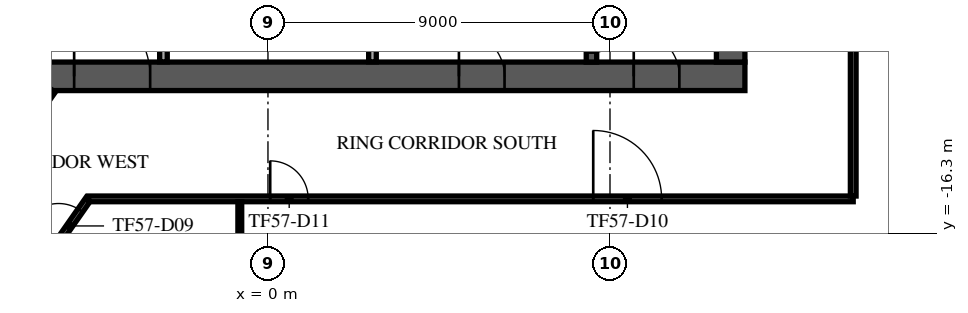
"""IFC4 building model, lengths in metres.
Left out: names, types, materials, properties, quantities, classifications, styles, units other than length and angle.
Written with IfcOpenShell. Run it as: python <this file> out.ifc"""

import sys

from ifc_helpers import new_model, si_unit, direction, frame, frame_2d, origin, place, context, subcontext, project, spatial, rectangle, extrude, element, fill, save


model = new_model("IFC4")
c1 = context("Model", 3, precision=1e-05, world=origin(), true_north=direction((0.0, 1.0)))
c2 = subcontext(c1, "Body", "Model", "MODEL_VIEW")
j1 = project(units=[si_unit("LENGTHUNIT", "METRE"), si_unit("PLANEANGLEUNIT", "RADIAN")], contexts=[c1])
p1 = place(None, origin())
s1 = spatial("IfcSite", under=j1, at=p1, CompositionType="ELEMENT")
p2 = place(p1, origin())
s2 = spatial("IfcBuilding", under=s1, at=p2, CompositionType="ELEMENT")
p3 = place(p2, frame((0.0, 0.0, 246.9)))
s3 = spatial("IfcBuildingStorey", under=s2, at=p3, CompositionType="ELEMENT", Elevation=246.9)
p4 = place(p3, frame((-12.55, -12.175, 0.0), z_axis=(0.0, 0.0, 1.0), x_axis=(1.0, 0.0, 0.0)))
e1 = element("IfcWall", 1, at=p4, inside=s3, PredefinedType="SHEAR", context=c2, shape_type="SweptSolid", body=[
    extrude(rectangle(XDim=25.1, YDim=0.75, at=frame_2d((12.55, 0.0))), origin(), (0.0, 0.0, 1.0), 3.64),
])
p5 = place(p4, frame((7.45, 0.0, 0.0)))
e2 = element("IfcOpeningElement", 2, at=p5, cuts=e1, PredefinedType="OPENING", context=c2, shape_type="SweptSolid", body=[
    extrude(rectangle(XDim=2.0, YDim=2.1, at=frame_2d((1.0, 1.05))), frame((0.0, 0.385, 0.0), z_axis=(0.0, -1.0, 0.0), x_axis=(1.0, 0.0, 0.0)), (0.0, 0.0, 1.0), 0.77),
])
p6 = place(p4, frame((17.575, 0.0, 0.0)))
e3 = element("IfcOpeningElement", 3, at=p6, cuts=e1, PredefinedType="OPENING", context=c2, shape_type="SweptSolid", body=[
    extrude(rectangle(XDim=1.2, YDim=2.1, at=frame_2d((0.6, 1.05))), frame((0.0, 0.385, 0.0), z_axis=(0.0, -1.0, 0.0), x_axis=(1.0, 0.0, 0.0)), (0.0, 0.0, 1.0), 0.77),
])
p7 = place(p4, frame((1.725, 0.0, 0.0)))
e4 = element("IfcOpeningElement", 4, at=p7, cuts=e1, PredefinedType="OPENING", context=c2, shape_type="SweptSolid", body=[
    extrude(rectangle(XDim=1.2, YDim=2.1, at=frame_2d((0.6, 1.05))), frame((0.0, 0.385, 0.0), z_axis=(0.0, -1.0, 0.0), x_axis=(1.0, 0.0, 0.0)), (0.0, 0.0, 1.0), 0.77),
])
p8 = place(p4, frame((22.175, 0.0, 0.0)))
e5 = element("IfcOpeningElement", 5, at=p8, cuts=e1, PredefinedType="OPENING", context=c2, shape_type="SweptSolid", body=[
    extrude(rectangle(XDim=1.2, YDim=2.1, at=frame_2d((0.6, 1.05))), frame((0.0, 0.385, 0.0), z_axis=(0.0, -1.0, 0.0), x_axis=(1.0, 0.0, 0.0)), (0.0, 0.0, 1.0), 0.77),
])
p9 = place(p3, frame((12.175, -11.8, 0.0), z_axis=(0.0, 0.0, 1.0), x_axis=(0.0, 1.0, 0.0)))
e6 = element("IfcWall", 6, at=p9, inside=s3, PredefinedType="SHEAR", context=c2, shape_type="SweptSolid", body=[
    extrude(rectangle(XDim=23.6, YDim=0.75, at=frame_2d((11.8, 0.0))), origin(), (0.0, 0.0, 1.0), 3.64),
])
p10 = place(p9, frame((10.6, 0.0, 0.0)))
e7 = element("IfcOpeningElement", 7, at=p10, cuts=e6, PredefinedType="OPENING", context=c2, shape_type="SweptSolid", body=[
    extrude(rectangle(XDim=2.4, YDim=2.4, at=frame_2d((1.2, 1.2))), frame((0.0, 0.385, 0.0), z_axis=(0.0, -1.0, 0.0), x_axis=(1.0, 0.0, 0.0)), (0.0, 0.0, 1.0), 0.77),
])
p11 = place(p3, frame((8.512, -4.55, 0.0), z_axis=(0.0, 0.0, 1.0), x_axis=(0.0, -1.0, 0.0)))
e8 = element("IfcWall", 8, at=p11, inside=s3, PredefinedType="SOLIDWALL", context=c2, shape_type="SweptSolid", body=[
    extrude(rectangle(XDim=7.25, YDim=0.275, at=frame_2d((3.625, 0.0))), origin(), (0.0, 0.0, 1.0), 3.64),
])
p12 = place(p11, frame((6.0, 0.0, 0.0)))
e9 = element("IfcOpeningElement", 9, at=p12, cuts=e8, PredefinedType="OPENING", context=c2, shape_type="SweptSolid", body=[
    extrude(rectangle(XDim=1.0, YDim=2.1, at=frame_2d((0.5, 1.05))), frame((0.0, 0.147, 0.0), z_axis=(0.0, -1.0, 0.0), x_axis=(1.0, 0.0, 0.0)), (0.0, 0.0, 1.0), 0.295),
])
p13 = place(p3, frame((-2.75, -11.795, 0.0), z_axis=(0.0, 0.0, 1.0), x_axis=(0.0, 1.0, 0.0)))
e10 = element("IfcWall", 10, at=p13, inside=s3, PredefinedType="PARTITIONING", context=c2, shape_type="SweptSolid", body=[
    extrude(rectangle(XDim=2.99, YDim=0.2, at=frame_2d((1.495, 0.0))), origin(), (0.0, 0.0, 1.0), 3.64),
])
p14 = place(p13, frame((0.657, 0.0, 0.0)))
e11 = element("IfcOpeningElement", 11, at=p14, cuts=e10, PredefinedType="OPENING", context=c2, shape_type="SweptSolid", body=[
    extrude(rectangle(XDim=1.8, YDim=2.1, at=frame_2d((0.9, 1.05))), frame((0.0, 0.11, 0.0), z_axis=(0.0, -1.0, 0.0), x_axis=(1.0, 0.0, 0.0)), (0.0, 0.0, 1.0), 0.22),
])
p15 = place(p3, frame((2.75, -11.795, 0.0), z_axis=(0.0, 0.0, 1.0), x_axis=(0.0, 1.0, 0.0)))
e12 = element("IfcWall", 12, at=p15, inside=s3, PredefinedType="PARTITIONING", context=c2, shape_type="SweptSolid", body=[
    extrude(rectangle(XDim=2.99, YDim=0.2, at=frame_2d((1.495, 0.0))), origin(), (0.0, 0.0, 1.0), 3.64),
])
p16 = place(p3, frame((-31.815, -13.98, 0.0), z_axis=(0.0, 0.0, 1.0), x_axis=(0.819151180661, -0.573577669737, 0.0)))
e13 = element("IfcWall", 13, at=p16, inside=s3, PredefinedType="STANDARD", context=c2, shape_type="SweptSolid", body=[
    extrude(rectangle(XDim=36.086, YDim=0.6, at=frame_2d((18.043, 0.0))), origin(), (0.0, 0.0, 1.0), 3.64),
])
p17 = place(p16, frame((1.205, 0.0, 0.9)))
e14 = element("IfcOpeningElement", 14, at=p17, cuts=e13, PredefinedType="OPENING", context=c2, shape_type="SweptSolid", body=[
    extrude(rectangle(XDim=2.1, YDim=2.1, at=frame_2d((1.05, 1.05))), frame((0.0, 0.31, 0.0), z_axis=(0.0, -1.0, 0.0), x_axis=(1.0, 0.0, 0.0)), (0.0, 0.0, 1.0), 0.62),
])
p18 = place(p16, frame((5.716, 0.0, 0.9)))
e15 = element("IfcOpeningElement", 15, at=p18, cuts=e13, PredefinedType="OPENING", context=c2, shape_type="SweptSolid", body=[
    extrude(rectangle(XDim=2.1, YDim=2.1, at=frame_2d((1.05, 1.05))), frame((0.0, 0.31, 0.0), z_axis=(0.0, -1.0, 0.0), x_axis=(1.0, 0.0, 0.0)), (0.0, 0.0, 1.0), 0.62),
])
p19 = place(p16, frame((10.227, 0.0, 0.9)))
e16 = element("IfcOpeningElement", 16, at=p19, cuts=e13, PredefinedType="OPENING", context=c2, shape_type="SweptSolid", body=[
    extrude(rectangle(XDim=2.1, YDim=2.1, at=frame_2d((1.05, 1.05))), frame((0.0, 0.31, 0.0), z_axis=(0.0, -1.0, 0.0), x_axis=(1.0, 0.0, 0.0)), (0.0, 0.0, 1.0), 0.62),
])
p20 = place(p16, frame((14.738, 0.0, 0.9)))
e17 = element("IfcOpeningElement", 17, at=p20, cuts=e13, PredefinedType="OPENING", context=c2, shape_type="SweptSolid", body=[
    extrude(rectangle(XDim=2.1, YDim=2.1, at=frame_2d((1.05, 1.05))), frame((0.0, 0.31, 0.0), z_axis=(0.0, -1.0, 0.0), x_axis=(1.0, 0.0, 0.0)), (0.0, 0.0, 1.0), 0.62),
])
p21 = place(p16, frame((19.249, 0.0, 0.9)))
e18 = element("IfcOpeningElement", 18, at=p21, cuts=e13, PredefinedType="OPENING", context=c2, shape_type="SweptSolid", body=[
    extrude(rectangle(XDim=2.1, YDim=2.1, at=frame_2d((1.05, 1.05))), frame((0.0, 0.31, 0.0), z_axis=(0.0, -1.0, 0.0), x_axis=(1.0, 0.0, 0.0)), (0.0, 0.0, 1.0), 0.62),
])
p22 = place(p16, frame((23.759, 0.0, 0.9)))
e19 = element("IfcOpeningElement", 19, at=p22, cuts=e13, PredefinedType="OPENING", context=c2, shape_type="SweptSolid", body=[
    extrude(rectangle(XDim=2.1, YDim=2.1, at=frame_2d((1.05, 1.05))), frame((0.0, 0.31, 0.0), z_axis=(0.0, -1.0, 0.0), x_axis=(1.0, 0.0, 0.0)), (0.0, 0.0, 1.0), 0.62),
])
p23 = place(p16, frame((28.27, 0.0, 0.9)))
e20 = element("IfcOpeningElement", 20, at=p23, cuts=e13, PredefinedType="OPENING", context=c2, shape_type="SweptSolid", body=[
    extrude(rectangle(XDim=2.1, YDim=2.1, at=frame_2d((1.05, 1.05))), frame((0.0, 0.31, 0.0), z_axis=(0.0, -1.0, 0.0), x_axis=(1.0, 0.0, 0.0)), (0.0, 0.0, 1.0), 0.62),
])
p24 = place(p16, frame((32.781, 0.0, 0.9)))
e21 = element("IfcOpeningElement", 21, at=p24, cuts=e13, PredefinedType="OPENING", context=c2, shape_type="SweptSolid", body=[
    extrude(rectangle(XDim=2.1, YDim=2.1, at=frame_2d((1.05, 1.05))), frame((0.0, 0.31, 0.0), z_axis=(0.0, -1.0, 0.0), x_axis=(1.0, 0.0, 0.0)), (0.0, 0.0, 1.0), 0.62),
])
p25 = place(p3, frame((5.206, -33.362, 0.0), z_axis=(0.0, 0.0, 1.0), x_axis=(0.573577438409, 0.81915134264, 0.0)))
e22 = element("IfcWall", 22, at=p25, inside=s3, PredefinedType="STANDARD", context=c2, shape_type="SweptSolid", body=[
    extrude(rectangle(XDim=48.686, YDim=0.6, at=frame_2d((24.343, 0.0))), origin(), (0.0, 0.0, 1.0), 3.64),
])
p26 = place(p25, frame((1.213, 0.0, 0.9)))
e23 = element("IfcOpeningElement", 23, at=p26, cuts=e22, PredefinedType="OPENING", context=c2, shape_type="SweptSolid", body=[
    extrude(rectangle(XDim=2.0, YDim=2.1, at=frame_2d((1.0, 1.05))), frame((0.0, 0.31, 0.0), z_axis=(0.0, -1.0, 0.0), x_axis=(1.0, 0.0, 0.0)), (0.0, 0.0, 1.0), 0.62),
])
p27 = place(p25, frame((5.639, 0.0, 0.9)))
e24 = element("IfcOpeningElement", 24, at=p27, cuts=e22, PredefinedType="OPENING", context=c2, shape_type="SweptSolid", body=[
    extrude(rectangle(XDim=2.0, YDim=2.1, at=frame_2d((1.0, 1.05))), frame((0.0, 0.31, 0.0), z_axis=(0.0, -1.0, 0.0), x_axis=(1.0, 0.0, 0.0)), (0.0, 0.0, 1.0), 0.62),
])
p28 = place(p25, frame((10.065, 0.0, 0.9)))
e25 = element("IfcOpeningElement", 25, at=p28, cuts=e22, PredefinedType="OPENING", context=c2, shape_type="SweptSolid", body=[
    extrude(rectangle(XDim=2.0, YDim=2.1, at=frame_2d((1.0, 1.05))), frame((0.0, 0.31, 0.0), z_axis=(0.0, -1.0, 0.0), x_axis=(1.0, 0.0, 0.0)), (0.0, 0.0, 1.0), 0.62),
])
p29 = place(p25, frame((14.491, 0.0, 0.9)))
e26 = element("IfcOpeningElement", 26, at=p29, cuts=e22, PredefinedType="OPENING", context=c2, shape_type="SweptSolid", body=[
    extrude(rectangle(XDim=2.0, YDim=2.1, at=frame_2d((1.0, 1.05))), frame((0.0, 0.31, 0.0), z_axis=(0.0, -1.0, 0.0), x_axis=(1.0, 0.0, 0.0)), (0.0, 0.0, 1.0), 0.62),
])
p30 = place(p25, frame((18.917, 0.0, 0.9)))
e27 = element("IfcOpeningElement", 27, at=p30, cuts=e22, PredefinedType="OPENING", context=c2, shape_type="SweptSolid", body=[
    extrude(rectangle(XDim=2.0, YDim=2.1, at=frame_2d((1.0, 1.05))), frame((0.0, 0.31, 0.0), z_axis=(0.0, -1.0, 0.0), x_axis=(1.0, 0.0, 0.0)), (0.0, 0.0, 1.0), 0.62),
])
p31 = place(p25, frame((23.343, 0.0, 0.9)))
e28 = element("IfcOpeningElement", 28, at=p31, cuts=e22, PredefinedType="OPENING", context=c2, shape_type="SweptSolid", body=[
    extrude(rectangle(XDim=2.0, YDim=2.1, at=frame_2d((1.0, 1.05))), frame((0.0, 0.31, 0.0), z_axis=(0.0, -1.0, 0.0), x_axis=(1.0, 0.0, 0.0)), (0.0, 0.0, 1.0), 0.62),
])
p32 = place(p25, frame((27.769, 0.0, 0.9)))
e29 = element("IfcOpeningElement", 29, at=p32, cuts=e22, PredefinedType="OPENING", context=c2, shape_type="SweptSolid", body=[
    extrude(rectangle(XDim=2.0, YDim=2.1, at=frame_2d((1.0, 1.05))), frame((0.0, 0.31, 0.0), z_axis=(0.0, -1.0, 0.0), x_axis=(1.0, 0.0, 0.0)), (0.0, 0.0, 1.0), 0.62),
])
p33 = place(p25, frame((32.195, 0.0, 0.9)))
e30 = element("IfcOpeningElement", 30, at=p33, cuts=e22, PredefinedType="OPENING", context=c2, shape_type="SweptSolid", body=[
    extrude(rectangle(XDim=2.0, YDim=2.1, at=frame_2d((1.0, 1.05))), frame((0.0, 0.31, 0.0), z_axis=(0.0, -1.0, 0.0), x_axis=(1.0, 0.0, 0.0)), (0.0, 0.0, 1.0), 0.62),
])
p34 = place(p25, frame((36.621, 0.0, 0.9)))
e31 = element("IfcOpeningElement", 31, at=p34, cuts=e22, PredefinedType="OPENING", context=c2, shape_type="SweptSolid", body=[
    extrude(rectangle(XDim=2.0, YDim=2.1, at=frame_2d((1.0, 1.05))), frame((0.0, 0.31, 0.0), z_axis=(0.0, -1.0, 0.0), x_axis=(1.0, 0.0, 0.0)), (0.0, 0.0, 1.0), 0.62),
])
p35 = place(p25, frame((41.047, 0.0, 0.9)))
e32 = element("IfcOpeningElement", 32, at=p35, cuts=e22, PredefinedType="OPENING", context=c2, shape_type="SweptSolid", body=[
    extrude(rectangle(XDim=2.0, YDim=2.1, at=frame_2d((1.0, 1.05))), frame((0.0, 0.31, 0.0), z_axis=(0.0, -1.0, 0.0), x_axis=(1.0, 0.0, 0.0)), (0.0, 0.0, 1.0), 0.62),
])
p36 = place(p25, frame((45.473, 0.0, 0.9)))
e33 = element("IfcOpeningElement", 33, at=p36, cuts=e22, PredefinedType="OPENING", context=c2, shape_type="SweptSolid", body=[
    extrude(rectangle(XDim=2.0, YDim=2.1, at=frame_2d((1.0, 1.05))), frame((0.0, 0.31, 0.0), z_axis=(0.0, -1.0, 0.0), x_axis=(1.0, 0.0, 0.0)), (0.0, 0.0, 1.0), 0.62),
])
p37 = place(p3, frame((-26.231, -7.537, 0.0), z_axis=(0.0, 0.0, 1.0), x_axis=(0.819166569978, -0.573555690959, 0.0)))
e34 = element("IfcWall", 34, at=p37, inside=s3, PredefinedType="PARTITIONING", context=c2, shape_type="SweptSolid", body=[
    extrude(rectangle(XDim=34.403, YDim=0.15, at=frame_2d((17.201, 0.0))), origin(), (0.0, 0.0, 1.0), 3.24),
])
p38 = place(p37, frame((3.05, 0.0, 0.0)))
e35 = element("IfcOpeningElement", 35, at=p38, cuts=e34, PredefinedType="OPENING", context=c2, shape_type="SweptSolid", body=[
    extrude(rectangle(XDim=1.8, YDim=2.1, at=frame_2d((0.9, 1.05))), frame((0.0, 0.085, 0.0), z_axis=(0.0, -1.0, 0.0), x_axis=(1.0, 0.0, 0.0)), (0.0, 0.0, 1.0), 0.17),
])
p39 = place(p37, frame((13.103, 0.0, 0.0)))
e36 = element("IfcOpeningElement", 36, at=p39, cuts=e34, PredefinedType="OPENING", context=c2, shape_type="SweptSolid", body=[
    extrude(rectangle(XDim=1.0, YDim=2.1, at=frame_2d((0.5, 1.05))), frame((0.0, 0.085, 0.0), z_axis=(0.0, -1.0, 0.0), x_axis=(1.0, 0.0, 0.0)), (0.0, 0.0, 1.0), 0.17),
])
p40 = place(p37, frame((19.173, 0.0, 0.0)))
e37 = element("IfcOpeningElement", 37, at=p40, cuts=e34, PredefinedType="OPENING", context=c2, shape_type="SweptSolid", body=[
    extrude(rectangle(XDim=1.0, YDim=2.1, at=frame_2d((0.5, 1.05))), frame((0.0, 0.085, 0.0), z_axis=(0.0, -1.0, 0.0), x_axis=(1.0, 0.0, 0.0)), (0.0, 0.0, 1.0), 0.17),
])
p41 = place(p3, frame((-8.651, -16.825, 0.0), z_axis=(0.0, 0.0, 1.0), x_axis=(0.57354712093, 0.819172570386, 0.0)))
e38 = element("IfcWall", 38, at=p41, inside=s3, PredefinedType="PARTITIONING", context=c2, shape_type="SweptSolid", body=[
    extrude(rectangle(XDim=5.218, YDim=0.15, at=frame_2d((2.609, 0.0))), origin(), (0.0, 0.0, 1.0), 3.24),
])
p42 = place(p3, frame((-6.685, -18.201, 0.0), z_axis=(0.0, 0.0, 1.0), x_axis=(0.573438386326, 0.819248690623, 0.0)))
e39 = element("IfcWall", 39, at=p42, inside=s3, PredefinedType="PARTITIONING", context=c2, shape_type="SweptSolid", body=[
    extrude(rectangle(XDim=3.42, YDim=0.15, at=frame_2d((1.71, 0.0))), origin(), (0.0, 0.0, 1.0), 3.24),
])
p43 = place(p42, frame((2.05, 0.0, 0.0)))
e40 = element("IfcOpeningElement", 40, at=p43, cuts=e39, PredefinedType="OPENING", context=c2, shape_type="SweptSolid", body=[
    extrude(rectangle(XDim=1.0, YDim=2.1, at=frame_2d((0.5, 1.05))), frame((0.0, 0.085, 0.0), z_axis=(0.0, -1.0, 0.0), x_axis=(1.0, 0.0, 0.0)), (0.0, 0.0, 1.0), 0.17),
])
p44 = place(p3, frame((-4.723, -15.4, 0.0), z_axis=(0.0, 0.0, 1.0), x_axis=(1.0, 0.0, 0.0)))
e41 = element("IfcWall", 41, at=p44, inside=s3, PredefinedType="PARTITIONING", context=c2, shape_type="SweptSolid", body=[
    extrude(rectangle(XDim=20.123, YDim=0.15, at=frame_2d((10.062, 0.0))), origin(), (0.0, 0.0, 1.0), 3.24),
])
p45 = place(p44, frame((13.282, 0.0, 0.0)))
e42 = element("IfcOpeningElement", 42, at=p45, cuts=e41, PredefinedType="OPENING", context=c2, shape_type="SweptSolid", body=[
    extrude(rectangle(XDim=1.8, YDim=2.1, at=frame_2d((0.9, 1.05))), frame((0.0, 0.085, 0.0), z_axis=(0.0, -1.0, 0.0), x_axis=(1.0, 0.0, 0.0)), (0.0, 0.0, 1.0), 0.17),
])
p46 = place(p44, frame((4.782, 0.0, 0.0)))
e43 = element("IfcOpeningElement", 43, at=p46, cuts=e41, PredefinedType="OPENING", context=c2, shape_type="SweptSolid", body=[
    extrude(rectangle(XDim=1.0, YDim=2.1, at=frame_2d((0.5, 1.05))), frame((0.0, 0.085, 0.0), z_axis=(0.0, -1.0, 0.0), x_axis=(1.0, 0.0, 0.0)), (0.0, 0.0, 1.0), 0.17),
])
p47 = place(p3, frame((15.4, -15.325, 0.0), z_axis=(0.0, 0.0, 1.0), x_axis=(0.0, 1.0, 0.0)))
e44 = element("IfcWall", 44, at=p47, inside=s3, PredefinedType="PARTITIONING", context=c2, shape_type="SweptSolid", body=[
    extrude(rectangle(XDim=17.715, YDim=0.15, at=frame_2d((8.857, 0.0))), origin(), (0.0, 0.0, 1.0), 3.24),
])
p48 = place(p47, frame((7.812, 0.0, 0.0)))
e45 = element("IfcOpeningElement", 45, at=p48, cuts=e44, PredefinedType="OPENING", context=c2, shape_type="SweptSolid", body=[
    extrude(rectangle(XDim=1.0, YDim=2.1, at=frame_2d((0.5, 1.05))), frame((0.0, 0.085, 0.0), z_axis=(0.0, -1.0, 0.0), x_axis=(1.0, 0.0, 0.0)), (0.0, 0.0, 1.0), 0.17),
])
p49 = place(p47, frame((15.123, 0.0, 0.0)))
e46 = element("IfcOpeningElement", 46, at=p49, cuts=e44, PredefinedType="OPENING", context=c2, shape_type="SweptSolid", body=[
    extrude(rectangle(XDim=1.0, YDim=2.1, at=frame_2d((0.5, 1.05))), frame((0.0, 0.085, 0.0), z_axis=(0.0, -1.0, 0.0), x_axis=(1.0, 0.0, 0.0)), (0.0, 0.0, 1.0), 0.17),
])
p50 = place(p3, frame((-0.741, -18.761, 0.0), z_axis=(0.0, 0.0, 1.0), x_axis=(0.0, 1.0, 0.0)))
e47 = element("IfcWall", 47, at=p50, inside=s3, PredefinedType="PARTITIONING", context=c2, shape_type="SweptSolid", body=[
    extrude(rectangle(XDim=3.286, YDim=0.1, at=frame_2d((1.643, 0.0))), origin(), (0.0, 0.0, 1.0), 3.64),
])
p51 = place(p3, frame((15.482, -11.068, 0.0), z_axis=(0.0, 0.0, 1.0), x_axis=(0.990680100766, -0.136209169832, 0.0)))
e48 = element("IfcWall", 48, at=p51, inside=s3, PredefinedType="PARTITIONING", context=c2, shape_type="SweptSolid", body=[
    extrude(rectangle(XDim=4.573, YDim=0.1, at=frame_2d((2.286, 0.0))), origin(), (0.0, 0.0, 1.0), 3.12),
])
p52 = place(p5, origin())
e49 = element("IfcDoor", 49, at=p52, inside=s3, OperationType="SINGLE_SWING_LEFT", PredefinedType="DOOR", context=c2, shape_type="SweptSolid", body=[
    extrude(rectangle(XDim=2.0, YDim=2.1, at=frame_2d((1.0, 1.05))), frame((0.0, 0.025, 0.0), z_axis=(0.0, -1.0, 0.0), x_axis=(1.0, 0.0, 0.0)), (0.0, 0.0, 1.0), 0.05),
])
fill(e2, e49)
p53 = place(p6, origin())
e50 = element("IfcDoor", 50, at=p53, inside=s3, OperationType="SINGLE_SWING_LEFT", PredefinedType="DOOR", context=c2, shape_type="SweptSolid", body=[
    extrude(rectangle(XDim=1.2, YDim=2.1, at=frame_2d((0.6, 1.05))), frame((0.0, 0.025, 0.0), z_axis=(0.0, -1.0, 0.0), x_axis=(1.0, 0.0, 0.0)), (0.0, 0.0, 1.0), 0.05),
])
fill(e3, e50)
p54 = place(p8, origin())
e51 = element("IfcDoor", 51, at=p54, inside=s3, OperationType="SINGLE_SWING_LEFT", PredefinedType="DOOR", context=c2, shape_type="SweptSolid", body=[
    extrude(rectangle(XDim=1.2, YDim=2.1, at=frame_2d((0.6, 1.05))), frame((0.0, 0.025, 0.0), z_axis=(0.0, -1.0, 0.0), x_axis=(1.0, 0.0, 0.0)), (0.0, 0.0, 1.0), 0.05),
])
fill(e5, e51)
p55 = place(p30, origin())
e52 = element("IfcWindow", 52, at=p55, inside=s3, PartitioningType="SINGLE_PANEL", PredefinedType="WINDOW", context=c2, shape_type="SweptSolid", body=[
    extrude(rectangle(XDim=2.0, YDim=2.1, at=frame_2d((1.0, 1.05))), frame((0.0, 0.03, 0.0), z_axis=(0.0, -1.0, 0.0), x_axis=(1.0, 0.0, 0.0)), (0.0, 0.0, 1.0), 0.06),
])
fill(e27, e52)
p56 = place(p43, frame((1.0, 0.0, 0.0), z_axis=(0.0, 0.0, 1.0), x_axis=(-1.0, 0.0, 0.0)))
e53 = element("IfcDoor", 53, at=p56, inside=s3, OperationType="SINGLE_SWING_LEFT", PredefinedType="DOOR", context=c2, shape_type="SweptSolid", body=[
    extrude(rectangle(XDim=1.0, YDim=2.1, at=frame_2d((0.5, 1.05))), frame((0.0, 0.025, 0.0), z_axis=(0.0, -1.0, 0.0), x_axis=(1.0, 0.0, 0.0)), (0.0, 0.0, 1.0), 0.05),
])
fill(e40, e53)
p57 = place(p45, frame((1.8, 0.0, 0.0), z_axis=(0.0, 0.0, 1.0), x_axis=(-1.0, 0.0, 0.0)))
e54 = element("IfcDoor", 54, at=p57, inside=s3, OperationType="DOUBLE_DOOR_SINGLE_SWING", PredefinedType="DOOR", context=c2, shape_type="SweptSolid", body=[
    extrude(rectangle(XDim=1.8, YDim=2.1, at=frame_2d((0.9, 1.05))), frame((0.0, 0.025, 0.0), z_axis=(0.0, -1.0, 0.0), x_axis=(1.0, 0.0, 0.0)), (0.0, 0.0, 1.0), 0.05),
])
fill(e42, e54)
p58 = place(p46, frame((1.0, 0.0, 0.0), z_axis=(0.0, 0.0, 1.0), x_axis=(-1.0, 0.0, 0.0)))
e55 = element("IfcDoor", 55, at=p58, inside=s3, OperationType="SINGLE_SWING_RIGHT", PredefinedType="DOOR", context=c2, shape_type="SweptSolid", body=[
    extrude(rectangle(XDim=1.0, YDim=2.1, at=frame_2d((0.5, 1.05))), frame((0.0, 0.025, 0.0), z_axis=(0.0, -1.0, 0.0), x_axis=(1.0, 0.0, 0.0)), (0.0, 0.0, 1.0), 0.05),
])
fill(e43, e55)
save(model, sys.argv[1])
